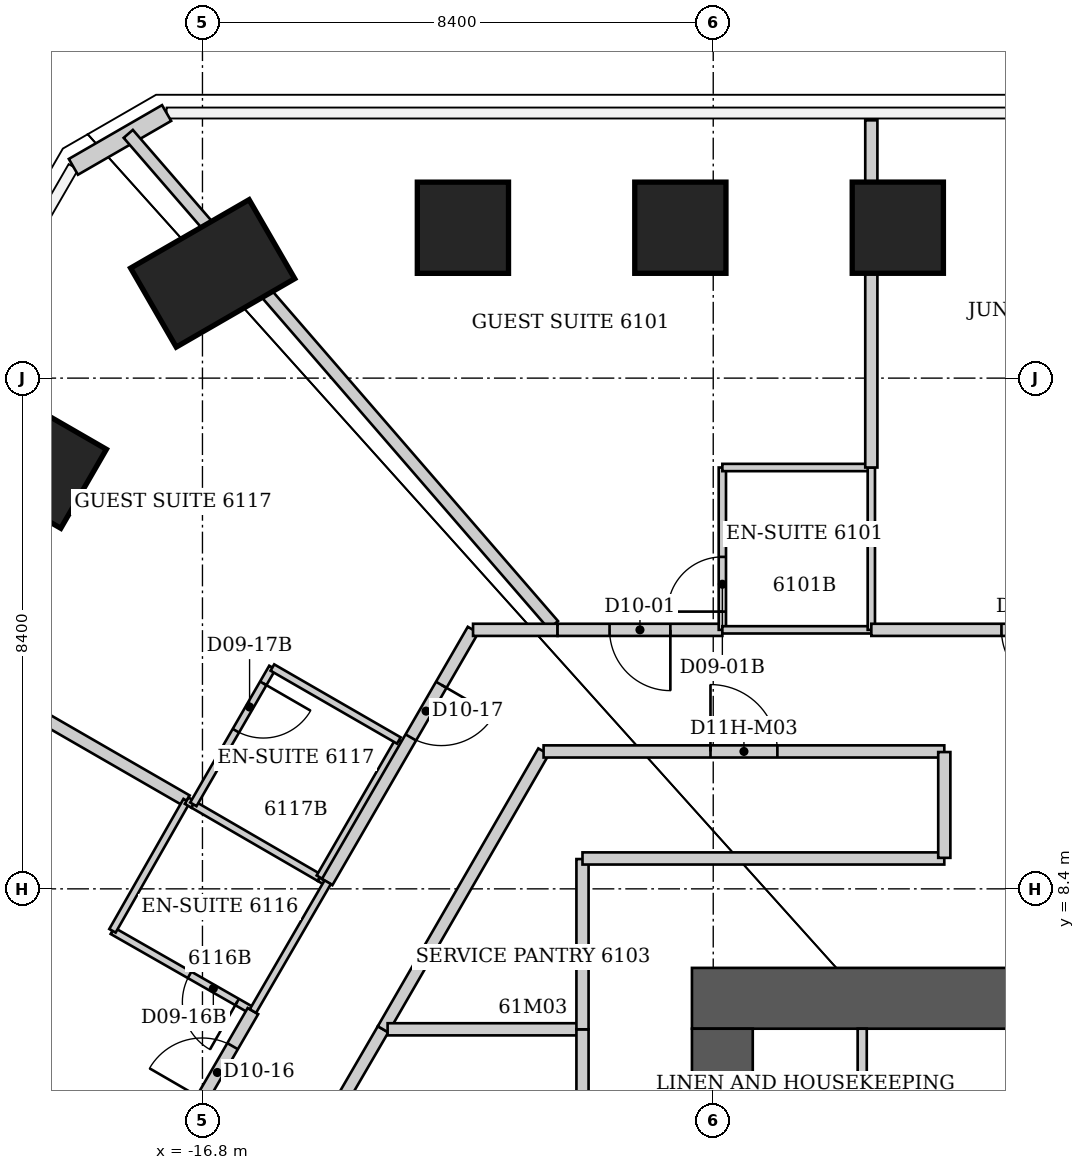
"""IFC4 building model, lengths in metres.
Left out: names, types, materials, properties, quantities, classifications, styles, units other than length and angle.
Written with IfcOpenShell. Run it as: python <this file> out.ifc"""

import sys

from ifc_helpers import new_model, si_unit, direction, frame, frame_2d, origin, origin_2d, place, context, subcontext, project, spatial, rectangle, extrude, element, fill, save


model = new_model("IFC4")
c1 = context("Model", 3, precision=1e-05, world=origin(), true_north=direction((0.0, 1.0)))
c2 = subcontext(c1, "Body", "Model", "MODEL_VIEW")
j1 = project(units=[si_unit("LENGTHUNIT", "METRE"), si_unit("PLANEANGLEUNIT", "RADIAN")], contexts=[c1])
p1 = place(None, origin())
s1 = spatial("IfcSite", under=j1, at=p1, CompositionType="ELEMENT")
p2 = place(p1, origin())
s2 = spatial("IfcBuilding", under=s1, at=p2, CompositionType="ELEMENT")
p3 = place(p2, frame((0.0, 0.0, 244.0)))
s3 = spatial("IfcBuildingStorey", under=s2, at=p3, CompositionType="ELEMENT", Elevation=244.0)
p4 = place(p3, frame((-12.517, 19.273, 0.0), z_axis=(0.035389237911, -0.054494297508, 0.997886753785), x_axis=(0.001945498476, 0.998514081693, 0.054459560185)))
e1 = element("IfcColumn", 1, at=p4, inside=s3, PredefinedType="COLUMN", context=c2, shape_type="SweptSolid", body=[
    extrude(rectangle(XDim=1.5, YDim=1.5, at=origin_2d()), origin(), (0.0, 0.0, 1.0), 3.808),
])
p5 = place(p3, frame((-8.941, 19.274, 0.0), z_axis=(0.025331473271, -0.054574895579, 0.998188307502), x_axis=(0.00115198679, 0.998509652845, 0.054563230311)))
e2 = element("IfcColumn", 2, at=p5, inside=s3, PredefinedType="COLUMN", context=c2, shape_type="SweptSolid", body=[
    extrude(rectangle(XDim=1.5, YDim=1.5, at=origin_2d()), origin(), (0.0, 0.0, 1.0), 3.807),
])
p6 = place(p3, frame((-5.365, 19.274, 0.0), z_axis=(0.015202005844, -0.054586105372, 0.998393337377), x_axis=(0.000673726901, 0.998509054749, 0.054582173615)))
e3 = element("IfcColumn", 3, at=p6, inside=s3, PredefinedType="COLUMN", context=c2, shape_type="SweptSolid", body=[
    extrude(rectangle(XDim=1.5, YDim=1.5, at=origin_2d()), origin(), (0.0, 0.0, 1.0), 3.806),
])
p7 = place(p3, frame((-19.405, 15.355, 0.0), z_axis=(0.05403142055, -0.042686745061, 0.997626406722), x_axis=(-0.864743208297, 0.497572308908, 0.068124746696)))
e4 = element("IfcColumn", 4, at=p7, inside=s3, PredefinedType="COLUMN", context=c2, shape_type="SweptSolid", body=[
    extrude(rectangle(XDim=1.5, YDim=1.5, at=origin_2d()), origin(), (0.0, 0.0, 1.0), 3.809),
])
p8 = place(p3, frame((-16.632, 18.523, 0.0), z_axis=(0.047422507184, -0.052869687063, 0.997474762589), x_axis=(-0.497441372682, 0.864710520134, 0.069482351101)))
e5 = element("IfcColumn", 5, at=p8, inside=s3, PredefinedType="COLUMN", context=c2, shape_type="SweptSolid", body=[
    extrude(rectangle(XDim=1.5, YDim=2.25, at=origin_2d()), origin(), (0.0, 0.0, 1.0), 3.81),
])
p9 = place(p3, frame((-8.75, 6.6, 0.0), z_axis=(0.0, 0.0, 1.0), x_axis=(1.0, 0.0, 0.0)))
e6 = element("IfcWall", 6, at=p9, inside=s3, PredefinedType="SHEAR", context=c2, shape_type="SweptSolid", body=[
    extrude(rectangle(XDim=17.5, YDim=1.0, at=frame_2d((8.75, 0.0))), origin(), (0.0, 0.0, 1.0), 3.8),
])
p10 = place(p9, frame((6.887, 0.0, 0.0)))
e7 = element("IfcOpeningElement", 7, at=p10, cuts=e6, PredefinedType="OPENING", context=c2, shape_type="SweptSolid", body=[
    extrude(rectangle(XDim=1.1, YDim=2.1, at=frame_2d((0.55, 1.05))), frame((0.0, 0.5, 0.0), z_axis=(0.0, -1.0, 0.0), x_axis=(1.0, 0.0, 0.0)), (0.0, 0.0, 1.0), 1.0),
])
p11 = place(p9, frame((9.512, 0.0, 0.0)))
e8 = element("IfcOpeningElement", 8, at=p11, cuts=e6, PredefinedType="OPENING", context=c2, shape_type="SweptSolid", body=[
    extrude(rectangle(XDim=1.1, YDim=2.1, at=frame_2d((0.55, 1.05))), frame((0.0, 0.5, 0.0), z_axis=(0.0, -1.0, 0.0), x_axis=(1.0, 0.0, 0.0)), (0.0, 0.0, 1.0), 1.0),
])
p12 = place(p9, frame((12.137, 0.0, 0.0)))
e9 = element("IfcOpeningElement", 9, at=p12, cuts=e6, PredefinedType="OPENING", context=c2, shape_type="SweptSolid", body=[
    extrude(rectangle(XDim=1.1, YDim=2.1, at=frame_2d((0.55, 1.05))), frame((0.0, 0.5, 0.0), z_axis=(0.0, -1.0, 0.0), x_axis=(1.0, 0.0, 0.0)), (0.0, 0.0, 1.0), 1.0),
])
p13 = place(p9, frame((14.762, 0.0, 0.0)))
e10 = element("IfcOpeningElement", 10, at=p13, cuts=e6, PredefinedType="OPENING", context=c2, shape_type="SweptSolid", body=[
    extrude(rectangle(XDim=1.1, YDim=2.1, at=frame_2d((0.55, 1.05))), frame((0.0, 0.5, 0.0), z_axis=(0.0, -1.0, 0.0), x_axis=(1.0, 0.0, 0.0)), (0.0, 0.0, 1.0), 1.0),
])
p14 = place(p3, frame((-8.25, -6.1, 0.0), z_axis=(0.0, 0.0, 1.0), x_axis=(0.0, 1.0, 0.0)))
e11 = element("IfcWall", 11, at=p14, inside=s3, PredefinedType="SHEAR", context=c2, shape_type="SweptSolid", body=[
    extrude(rectangle(XDim=12.2, YDim=1.0, at=frame_2d((6.1, 0.0))), origin(), (0.0, 0.0, 1.0), 3.8),
])
p15 = place(p14, frame((7.6, 0.0, 0.0)))
e12 = element("IfcOpeningElement", 12, at=p15, cuts=e11, PredefinedType="OPENING", context=c2, shape_type="SweptSolid", body=[
    extrude(rectangle(XDim=1.2, YDim=2.2, at=frame_2d((0.6, 1.1))), frame((0.0, 0.5, 0.0), z_axis=(0.0, -1.0, 0.0), x_axis=(1.0, 0.0, 0.0)), (0.0, 0.0, 1.0), 1.0),
])
p16 = place(p3, frame((-18.923, 20.275, 0.0), z_axis=(0.0, 0.0, 1.0), x_axis=(0.866036293601, 0.499981137809, 0.0)))
e13 = element("IfcWall", 13, at=p16, inside=s3, PredefinedType="SOLIDWALL", context=c2, shape_type="SweptSolid", body=[
    extrude(rectangle(XDim=1.77, YDim=0.3, at=frame_2d((0.885, 0.0))), origin(), (0.0, 0.0, 1.0), 3.64),
])
p17 = place(p3, frame((-27.041, 5.204, 0.0), z_axis=(0.0, 0.0, 1.0), x_axis=(0.981884490433, -0.18948046719, 0.0)))
e14 = element("IfcWall", 14, at=p17, inside=s3, PredefinedType="PARTITIONING", context=c2, shape_type="SweptSolid", body=[
    extrude(rectangle(XDim=10.684, YDim=0.2, at=frame_2d((5.342, 0.0))), origin(), (0.0, 0.0, 1.0), 3.64),
])
p18 = place(p3, frame((-22.866, 13.2, 0.0), z_axis=(0.0, 0.0, 1.0), x_axis=(0.866166787958, -0.499755035431, 0.0)))
e15 = element("IfcWall", 15, at=p18, inside=s3, PredefinedType="PARTITIONING", context=c2, shape_type="SweptSolid", body=[
    extrude(rectangle(XDim=6.703, YDim=0.2, at=frame_2d((3.352, 0.0))), origin(), (0.0, 0.0, 1.0), 2.878),
])
p19 = place(p3, frame((-18.28, 7.71, 0.0), z_axis=(0.0, 0.0, 1.0), x_axis=(0.868277022428, -0.496079643125, 0.0)))
e16 = element("IfcWall", 16, at=p19, inside=s3, PredefinedType="PARTITIONING", context=c2, shape_type="SweptSolid", body=[
    extrude(rectangle(XDim=2.66, YDim=0.12, at=frame_2d((1.33, 0.0))), origin(), (0.0, 0.0, 1.0), 3.64),
])
p20 = place(p19, frame((1.46, 0.0, 0.0)))
e17 = element("IfcOpeningElement", 17, at=p20, cuts=e16, PredefinedType="OPENING", context=c2, shape_type="SweptSolid", body=[
    extrude(rectangle(XDim=0.9, YDim=2.03, at=frame_2d((0.45, 1.015))), frame((0.0, 0.06, 0.0), z_axis=(0.0, -1.0, 0.0), x_axis=(1.0, 0.0, 0.0)), (0.0, 0.0, 1.0), 0.12),
])
p21 = place(p3, frame((-17.14, 4.37, 0.0), z_axis=(0.0, 0.0, 1.0), x_axis=(0.501176435338, 0.865345122285, 0.0)))
e18 = element("IfcWall", 18, at=p21, inside=s3, PredefinedType="PARTITIONING", context=c2, shape_type="SweptSolid", body=[
    extrude(rectangle(XDim=2.334, YDim=0.2, at=frame_2d((1.167, 0.0))), origin(), (0.0, 0.0, 1.0), 3.64),
])
p22 = place(p21, frame((0.667, 0.0, 0.0)))
e19 = element("IfcOpeningElement", 19, at=p22, cuts=e18, PredefinedType="OPENING", context=c2, shape_type="SweptSolid", body=[
    extrude(rectangle(XDim=1.0, YDim=2.13, at=frame_2d((0.5, 1.065))), frame((0.0, 0.1, 0.0), z_axis=(0.0, -1.0, 0.0), x_axis=(1.0, 0.0, 0.0)), (0.0, 0.0, 1.0), 0.2),
])
p23 = place(p3, frame((-17.06, 9.85, 0.0), z_axis=(0.0, 0.0, 1.0), x_axis=(-0.495231468673, -0.868761067518, 0.0)))
e20 = element("IfcWall", 20, at=p23, inside=s3, PredefinedType="PARTITIONING", context=c2, shape_type="SweptSolid", body=[
    extrude(rectangle(XDim=2.463, YDim=0.12, at=frame_2d((1.232, 0.0))), origin(), (0.0, 0.0, 1.0), 3.64),
])
p24 = place(p3, frame((-17.06, 9.85, 0.0), z_axis=(0.0, 0.0, 1.0), x_axis=(0.864625231999, -0.50241736454, 0.0)))
e21 = element("IfcWall", 21, at=p24, inside=s3, PredefinedType="PARTITIONING", context=c2, shape_type="SweptSolid", body=[
    extrude(rectangle(XDim=0.125, YDim=0.12, at=frame_2d((0.063, 0.0))), origin(), (0.0, 0.0, 1.0), 3.64),
])
p25 = place(p3, frame((-16.952, 9.787, 0.0), z_axis=(0.0, 0.0, 1.0), x_axis=(0.865015303714, -0.501745477648, 0.0)))
e22 = element("IfcWall", 22, at=p25, inside=s3, PredefinedType="PARTITIONING", context=c2, shape_type="SweptSolid", body=[
    extrude(rectangle(XDim=2.401, YDim=0.12, at=frame_2d((1.201, 0.0))), origin(), (0.0, 0.0, 1.0), 2.878),
])
p26 = place(p3, frame((-15.65, 12.04, 0.0), z_axis=(0.0, 0.0, 1.0), x_axis=(-0.500291685314, -0.865856933682, 0.0)))
e23 = element("IfcWall", 23, at=p26, inside=s3, PredefinedType="PARTITIONING", context=c2, shape_type="SweptSolid", body=[
    extrude(rectangle(XDim=2.599, YDim=0.12, at=frame_2d((1.299, 0.0))), origin(), (0.0, 0.0, 1.0), 3.64),
])
p27 = place(p26, frame((0.3, 0.0, 0.0)))
e24 = element("IfcOpeningElement", 24, at=p27, cuts=e23, PredefinedType="OPENING", context=c2, shape_type="SweptSolid", body=[
    extrude(rectangle(XDim=0.9, YDim=2.03, at=frame_2d((0.45, 1.015))), frame((0.0, 0.06, 0.0), z_axis=(0.0, -1.0, 0.0), x_axis=(1.0, 0.0, 0.0)), (0.0, 0.0, 1.0), 0.12),
])
p28 = place(p3, frame((-14.875, 8.582, 0.0), z_axis=(0.0, 0.0, 1.0), x_axis=(0.864883951565, -0.501971862085, 0.0)))
e25 = element("IfcWall", 25, at=p28, inside=s3, PredefinedType="PARTITIONING", context=c2, shape_type="SweptSolid", body=[
    extrude(rectangle(XDim=0.144, YDim=0.12, at=frame_2d((0.072, 0.0))), origin(), (0.0, 0.0, 1.0), 3.64),
])
p29 = place(p3, frame((-14.87, 8.59, 0.0), z_axis=(0.0, 0.0, 1.0), x_axis=(0.500291685314, 0.865856933682, 0.0)))
e26 = element("IfcWall", 26, at=p29, inside=s3, PredefinedType="PARTITIONING", context=c2, shape_type="SweptSolid", body=[
    extrude(rectangle(XDim=2.599, YDim=0.12, at=frame_2d((1.299, 0.0))), origin(), (0.0, 0.0, 1.0), 3.64),
])
p30 = place(p3, frame((-14.83, 4.37, 0.0), z_axis=(0.0, 0.0, 1.0), x_axis=(0.502626855825, 0.864503466623, 0.0)))
e27 = element("IfcWall", 27, at=p30, inside=s3, PredefinedType="PARTITIONING", context=c2, shape_type="SweptSolid", body=[
    extrude(rectangle(XDim=1.99, YDim=0.2, at=frame_2d((0.995, 0.0))), origin(), (0.0, 0.0, 1.0), 3.64),
])
p31 = place(p3, frame((-14.75, 8.51, 0.0), z_axis=(0.0, 0.0, 1.0), x_axis=(0.500618647881, 0.86566793252, 0.0)))
e28 = element("IfcWall", 28, at=p31, inside=s3, PredefinedType="PARTITIONING", context=c2, shape_type="SweptSolid", body=[
    extrude(rectangle(XDim=4.794, YDim=0.2, at=frame_2d((2.397, 0.0))), origin(), (0.0, 0.0, 1.0), 3.64),
])
p32 = place(p31, frame((2.75, 0.0, 0.0)))
e29 = element("IfcOpeningElement", 29, at=p32, cuts=e28, PredefinedType="OPENING", context=c2, shape_type="SweptSolid", body=[
    extrude(rectangle(XDim=1.0, YDim=2.13, at=frame_2d((0.5, 1.065))), frame((0.0, 0.1, 0.0), z_axis=(0.0, -1.0, 0.0), x_axis=(1.0, 0.0, 0.0)), (0.0, 0.0, 1.0), 0.2),
])
p33 = place(p3, frame((-14.74, 8.51, 0.0), z_axis=(0.0, 0.0, 1.0), x_axis=(-0.501813488763, -0.864975850817, 0.0)))
e30 = element("IfcWall", 30, at=p33, inside=s3, PredefinedType="PARTITIONING", context=c2, shape_type="SweptSolid", body=[
    extrude(rectangle(XDim=2.451, YDim=0.12, at=frame_2d((1.226, 0.0))), origin(), (0.0, 0.0, 1.0), 3.64),
])
p34 = place(p3, frame((-13.83, 6.09, 0.0), z_axis=(0.0, 0.0, 1.0), x_axis=(0.500248310865, 0.865881993967, 0.0)))
e31 = element("IfcWall", 31, at=p34, inside=s3, PredefinedType="PARTITIONING", context=c2, shape_type="SweptSolid", body=[
    extrude(rectangle(XDim=5.278, YDim=0.2, at=frame_2d((2.639, 0.0))), origin(), (0.0, 0.0, 1.0), 3.64),
])
p35 = place(p3, frame((-13.755, 6.09, 0.0), z_axis=(0.0, 0.0, 1.0), x_axis=(1.0, 0.0, 0.0)))
e32 = element("IfcWall", 32, at=p35, inside=s3, PredefinedType="PARTITIONING", context=c2, shape_type="SweptSolid", body=[
    extrude(rectangle(XDim=3.195, YDim=0.2, at=frame_2d((1.597, 0.0))), origin(), (0.0, 0.0, 1.0), 3.64),
])
p36 = place(p3, frame((-13.57, 10.84, 0.0), z_axis=(0.0, 0.0, 1.0), x_axis=(-0.866177122335, 0.499737123639, 0.0)))
e33 = element("IfcWall", 33, at=p36, inside=s3, PredefinedType="PARTITIONING", context=c2, shape_type="SweptSolid", body=[
    extrude(rectangle(XDim=2.401, YDim=0.12, at=frame_2d((1.201, 0.0))), origin(), (0.0, 0.0, 1.0), 3.64),
])
p37 = place(p3, frame((-11.19, 10.66, 0.0), z_axis=(0.0, 0.0, 1.0), x_axis=(1.0, 0.0, 0.0)))
e34 = element("IfcWall", 34, at=p37, inside=s3, PredefinedType="PARTITIONING", context=c2, shape_type="SweptSolid", body=[
    extrude(rectangle(XDim=6.59, YDim=0.2, at=frame_2d((3.295, 0.0))), origin(), (0.0, 0.0, 1.0), 3.64),
])
p38 = place(p37, frame((2.745, 0.0, 0.0)))
e35 = element("IfcOpeningElement", 35, at=p38, cuts=e34, PredefinedType="OPENING", context=c2, shape_type="SweptSolid", body=[
    extrude(rectangle(XDim=1.1, YDim=2.2, at=frame_2d((0.55, 1.1))), frame((0.0, 0.1, 0.0), z_axis=(0.0, -1.0, 0.0), x_axis=(1.0, 0.0, 0.0)), (0.0, 0.0, 1.0), 0.2),
])
p39 = place(p3, frame((-11.029, 12.74, 0.0), z_axis=(0.0, 0.0, 1.0), x_axis=(-0.654429261747, 0.756123231603, 0.0)))
e36 = element("IfcWall", 36, at=p39, inside=s3, PredefinedType="PARTITIONING", context=c2, shape_type="SweptSolid", body=[
    extrude(rectangle(XDim=10.683, YDim=0.2, at=frame_2d((5.342, 0.0))), origin(), (0.0, 0.0, 1.0), 3.64),
])
p40 = place(p3, frame((-10.96, 12.66, 0.0), z_axis=(0.0, 0.0, 1.0), x_axis=(-1.0, 0.0, 0.0)))
e37 = element("IfcWall", 37, at=p40, inside=s3, PredefinedType="PARTITIONING", context=c2, shape_type="SweptSolid", body=[
    extrude(rectangle(XDim=1.39, YDim=0.2, at=frame_2d((0.695, 0.0))), origin(), (0.0, 0.0, 1.0), 3.64),
])
p41 = place(p3, frame((-10.55, 6.09, 0.0), z_axis=(0.0, 0.0, 1.0), x_axis=(0.0, -1.0, 0.0)))
e38 = element("IfcWall", 38, at=p41, inside=s3, PredefinedType="PARTITIONING", context=c2, shape_type="SweptSolid", body=[
    extrude(rectangle(XDim=4.57, YDim=0.2, at=frame_2d((2.285, 0.0))), origin(), (0.0, 0.0, 1.0), 3.64),
])
p42 = place(p41, frame((1.735, 0.0, 0.0)))
e39 = element("IfcOpeningElement", 39, at=p42, cuts=e38, PredefinedType="OPENING", context=c2, shape_type="SweptSolid", body=[
    extrude(rectangle(XDim=1.1, YDim=2.2, at=frame_2d((0.55, 1.1))), frame((0.0, 0.1, 0.0), z_axis=(0.0, -1.0, 0.0), x_axis=(1.0, 0.0, 0.0)), (0.0, 0.0, 1.0), 0.2),
])
p43 = place(p3, frame((-10.55, 8.89, 0.0), z_axis=(0.0, 0.0, 1.0), x_axis=(0.0, -1.0, 0.0)))
e40 = element("IfcWall", 40, at=p43, inside=s3, PredefinedType="PARTITIONING", context=c2, shape_type="SweptSolid", body=[
    extrude(rectangle(XDim=2.8, YDim=0.2, at=frame_2d((1.4, 0.0))), origin(), (0.0, 0.0, 1.0), 3.64),
])
p44 = place(p3, frame((-8.25, 12.66, 0.0), z_axis=(0.0, 0.0, 1.0), x_axis=(-1.0, 0.0, 0.0)))
e41 = element("IfcWall", 41, at=p44, inside=s3, PredefinedType="PARTITIONING", context=c2, shape_type="SweptSolid", body=[
    extrude(rectangle(XDim=2.71, YDim=0.2, at=frame_2d((1.355, 0.0))), origin(), (0.0, 0.0, 1.0), 3.64),
])
p45 = place(p44, frame((0.855, 0.0, 0.0)))
e42 = element("IfcOpeningElement", 42, at=p45, cuts=e41, PredefinedType="OPENING", context=c2, shape_type="SweptSolid", body=[
    extrude(rectangle(XDim=1.0, YDim=2.13, at=frame_2d((0.5, 1.065))), frame((0.0, 0.1, 0.0), z_axis=(0.0, -1.0, 0.0), x_axis=(1.0, 0.0, 0.0)), (0.0, 0.0, 1.0), 0.2),
])
p46 = place(p3, frame((-8.25, 15.33, 0.0), z_axis=(0.0, 0.0, 1.0), x_axis=(0.0, -1.0, 0.0)))
e43 = element("IfcWall", 43, at=p46, inside=s3, PredefinedType="PARTITIONING", context=c2, shape_type="SweptSolid", body=[
    extrude(rectangle(XDim=2.67, YDim=0.12, at=frame_2d((1.335, 0.0))), origin(), (0.0, 0.0, 1.0), 3.64),
])
p47 = place(p46, frame((1.47, 0.0, 0.0)))
e44 = element("IfcOpeningElement", 44, at=p47, cuts=e43, PredefinedType="OPENING", context=c2, shape_type="SweptSolid", body=[
    extrude(rectangle(XDim=0.9, YDim=2.03, at=frame_2d((0.45, 1.015))), frame((0.0, 0.06, 0.0), z_axis=(0.0, -1.0, 0.0), x_axis=(1.0, 0.0, 0.0)), (0.0, 0.0, 1.0), 0.12),
])
for number, where, z_axis, x_axis in (
    (45, (-5.8, 12.66, 0.0), (0.0, 0.0, 1.0), (-1.0, 0.0, 0.0)),
    (46, (-5.8, 15.33, 0.0), (0.0, 0.0, 1.0), (-1.0, 0.0, 0.0)),
):
    element("IfcWall", number, at=place(p3, frame(where, z_axis=z_axis, x_axis=x_axis)), inside=s3, PredefinedType="PARTITIONING", context=c2, shape_type="SweptSolid", body=[
        extrude(rectangle(XDim=2.45, YDim=0.12, at=frame_2d((1.225, 0.0))), origin(), (0.0, 0.0, 1.0), 3.64),
    ])
p48 = place(p3, frame((-5.8, 15.33, 0.0), z_axis=(0.0, 0.0, 1.0), x_axis=(0.0, -1.0, 0.0)))
e47 = element("IfcWall", 47, at=p48, inside=s3, PredefinedType="PARTITIONING", context=c2, shape_type="SweptSolid", body=[
    extrude(rectangle(XDim=2.67, YDim=0.12, at=frame_2d((1.335, 0.0))), origin(), (0.0, 0.0, 1.0), 3.64),
])
p49 = place(p3, frame((-5.8, 21.04, 0.0), z_axis=(0.0, 0.0, 1.0), x_axis=(0.0, -1.0, 0.0)))
e48 = element("IfcWall", 48, at=p49, inside=s3, PredefinedType="PARTITIONING", context=c2, shape_type="SweptSolid", body=[
    extrude(rectangle(XDim=5.71, YDim=0.2, at=frame_2d((2.855, 0.0))), origin(), (0.0, 0.0, 1.0), 3.64),
])
p50 = place(p3, frame((-4.6, 8.9, 0.0), z_axis=(0.0, 0.0, 1.0), x_axis=(-1.0, 0.0, 0.0)))
e49 = element("IfcWall", 49, at=p50, inside=s3, PredefinedType="PARTITIONING", context=c2, shape_type="SweptSolid", body=[
    extrude(rectangle(XDim=5.95, YDim=0.2, at=frame_2d((2.975, 0.0))), origin(), (0.0, 0.0, 1.0), 3.64),
])
p51 = place(p3, frame((-4.6, 10.65, 0.0), z_axis=(0.0, 0.0, 1.0), x_axis=(0.0, -1.0, 0.0)))
e50 = element("IfcWall", 50, at=p51, inside=s3, PredefinedType="PARTITIONING", context=c2, shape_type="SweptSolid", body=[
    extrude(rectangle(XDim=1.74, YDim=0.2, at=frame_2d((0.87, 0.0))), origin(), (0.0, 0.0, 1.0), 3.64),
])
p52 = place(p3, frame((-0.52, 12.66, 0.0), z_axis=(0.0, 0.0, 1.0), x_axis=(-1.0, 0.0, 0.0)))
e51 = element("IfcWall", 51, at=p52, inside=s3, PredefinedType="PARTITIONING", context=c2, shape_type="SweptSolid", body=[
    extrude(rectangle(XDim=5.28, YDim=0.2, at=frame_2d((2.64, 0.0))), origin(), (0.0, 0.0, 1.0), 3.64),
])
p53 = place(p52, frame((2.14, 0.0, 0.0)))
e52 = element("IfcOpeningElement", 52, at=p53, cuts=e51, PredefinedType="OPENING", context=c2, shape_type="SweptSolid", body=[
    extrude(rectangle(XDim=1.0, YDim=2.13, at=frame_2d((0.5, 1.065))), frame((0.0, 0.1, 0.0), z_axis=(0.0, -1.0, 0.0), x_axis=(1.0, 0.0, 0.0)), (0.0, 0.0, 1.0), 0.2),
])
p54 = place(p3, frame((-5.95, 3.35, 0.0), z_axis=(0.0, 0.0, 1.0), x_axis=(0.0, 1.0, 0.0)))
e53 = element("IfcWall", 53, at=p54, inside=s3, PredefinedType="PARTITIONING", context=c2, shape_type="SweptSolid", body=[
    extrude(rectangle(XDim=2.75, YDim=0.15, at=frame_2d((1.375, 0.0))), origin(), (0.0, 0.0, 1.0), 3.64),
])
p55 = place(p45, origin())
e54 = element("IfcDoor", 54, at=p55, inside=s3, OperationType="SINGLE_SWING_LEFT", PredefinedType="DOOR", context=c2, shape_type="SweptSolid", body=[
    extrude(rectangle(XDim=1.0, YDim=2.13, at=frame_2d((0.5, 1.065))), frame((0.0, 0.025, 0.0), z_axis=(0.0, -1.0, 0.0), x_axis=(1.0, 0.0, 0.0)), (0.0, 0.0, 1.0), 0.05),
])
fill(e42, e54)
p56 = place(p47, origin())
e55 = element("IfcDoor", 55, at=p56, inside=s3, OperationType="SINGLE_SWING_RIGHT", PredefinedType="DOOR", context=c2, shape_type="SweptSolid", body=[
    extrude(rectangle(XDim=0.9, YDim=2.03, at=frame_2d((0.45, 1.015))), frame((0.0, 0.025, 0.0), z_axis=(0.0, -1.0, 0.0), x_axis=(1.0, 0.0, 0.0)), (0.0, 0.0, 1.0), 0.05),
])
fill(e44, e55)
p57 = place(p53, origin())
e56 = element("IfcDoor", 56, at=p57, inside=s3, OperationType="SINGLE_SWING_LEFT", PredefinedType="DOOR", context=c2, shape_type="SweptSolid", body=[
    extrude(rectangle(XDim=1.0, YDim=2.13, at=frame_2d((0.5, 1.065))), frame((0.0, 0.025, 0.0), z_axis=(0.0, -1.0, 0.0), x_axis=(1.0, 0.0, 0.0)), (0.0, 0.0, 1.0), 0.05),
])
fill(e52, e56)
p58 = place(p22, origin())
e57 = element("IfcDoor", 57, at=p58, inside=s3, OperationType="SINGLE_SWING_LEFT", PredefinedType="DOOR", context=c2, shape_type="SweptSolid", body=[
    extrude(rectangle(XDim=1.0, YDim=2.13, at=frame_2d((0.5, 1.065))), frame((0.0, 0.025, 0.0), z_axis=(0.0, -1.0, 0.0), x_axis=(1.0, 0.0, 0.0)), (0.0, 0.0, 1.0), 0.05),
])
fill(e19, e57)
p59 = place(p20, origin())
e58 = element("IfcDoor", 58, at=p59, inside=s3, OperationType="SINGLE_SWING_RIGHT", PredefinedType="DOOR", context=c2, shape_type="SweptSolid", body=[
    extrude(rectangle(XDim=0.9, YDim=2.03, at=frame_2d((0.45, 1.015))), frame((0.0, 0.025, 0.0), z_axis=(0.0, -1.0, 0.0), x_axis=(1.0, 0.0, 0.0)), (0.0, 0.0, 1.0), 0.05),
])
fill(e17, e58)
p60 = place(p32, origin())
e59 = element("IfcDoor", 59, at=p60, inside=s3, OperationType="SINGLE_SWING_RIGHT", PredefinedType="DOOR", context=c2, shape_type="SweptSolid", body=[
    extrude(rectangle(XDim=1.0, YDim=2.13, at=frame_2d((0.5, 1.065))), frame((0.0, 0.025, 0.0), z_axis=(0.0, -1.0, 0.0), x_axis=(1.0, 0.0, 0.0)), (0.0, 0.0, 1.0), 0.05),
])
fill(e29, e59)
p61 = place(p27, origin())
e60 = element("IfcDoor", 60, at=p61, inside=s3, OperationType="SINGLE_SWING_LEFT", PredefinedType="DOOR", context=c2, shape_type="SweptSolid", body=[
    extrude(rectangle(XDim=0.9, YDim=2.03, at=frame_2d((0.45, 1.015))), frame((0.0, 0.025, 0.0), z_axis=(0.0, -1.0, 0.0), x_axis=(1.0, 0.0, 0.0)), (0.0, 0.0, 1.0), 0.05),
])
fill(e24, e60)
p62 = place(p38, origin())
e61 = element("IfcDoor", 61, at=p62, inside=s3, OperationType="SINGLE_SWING_LEFT", PredefinedType="DOOR", context=c2, shape_type="SweptSolid", body=[
    extrude(rectangle(XDim=1.1, YDim=2.2, at=frame_2d((0.55, 1.1))), frame((0.0, 0.025, 0.0), z_axis=(0.0, -1.0, 0.0), x_axis=(1.0, 0.0, 0.0)), (0.0, 0.0, 1.0), 0.05),
])
fill(e35, e61)
save(model, sys.argv[1])
